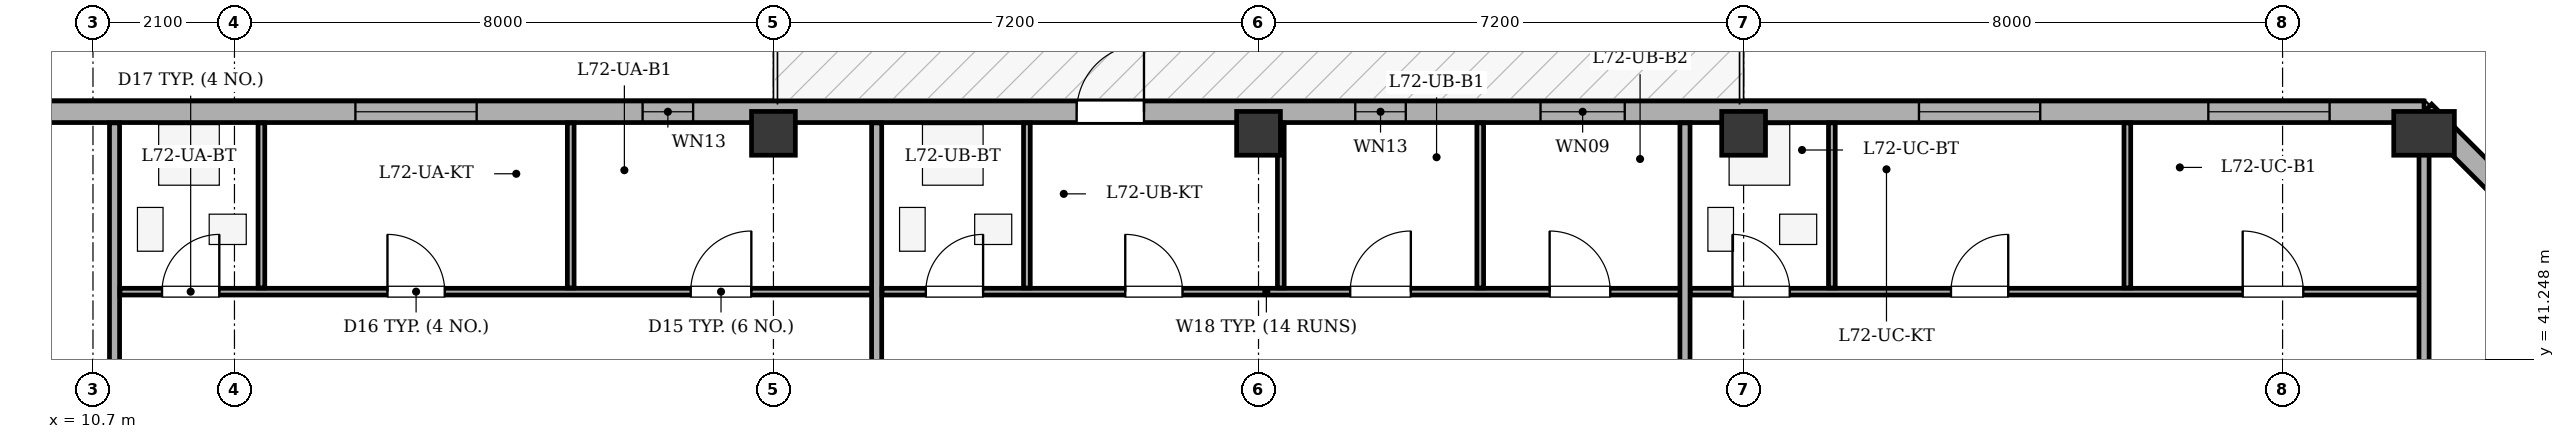
"""IFC4 building model, lengths in metres.
Left out: names, types, materials, properties, quantities, classifications, styles, units other than length and angle.
Written with IfcOpenShell. Run it as: python <this file> out.ifc"""

import sys

from ifc_helpers import new_model, si_unit, direction, frame, frame_2d, origin, origin_2d, place, context, subcontext, project, spatial, rectangle, extrude, element, fill, save


model = new_model("IFC4")
c1 = context("Model", 3, precision=1e-05, world=origin(), true_north=direction((0.0, 1.0)))
c2 = subcontext(c1, "Body", "Model", "MODEL_VIEW")
j1 = project(units=[si_unit("LENGTHUNIT", "METRE"), si_unit("PLANEANGLEUNIT", "RADIAN")], contexts=[c1])
p1 = place(None, origin())
s1 = spatial("IfcSite", under=j1, at=p1, CompositionType="ELEMENT")
p2 = place(p1, origin())
s2 = spatial("IfcBuilding", under=s1, at=p2, CompositionType="ELEMENT")
p3 = place(p2, frame((0.0, 0.0, 272.1)))
s3 = spatial("IfcBuildingStorey", under=s2, at=p3, CompositionType="ELEMENT", Elevation=272.1)
for number, where, z_axis, x_axis in (
    (1, (20.8, 44.6, 0.0), (0.0, 0.0, 1.0), (1.0, 0.0, 0.0)),
    (2, (28.0, 44.6, 0.0), (0.0, 0.0, 1.0), (1.0, 0.0, 0.0)),
    (3, (35.2, 44.6, 0.0), (0.0, 0.0, 1.0), (1.0, 0.0, 0.0)),
):
    element("IfcColumn", number, at=place(p3, frame(where, z_axis=z_axis, x_axis=x_axis)), inside=s3, PredefinedType="COLUMN", context=c2, shape_type="SweptSolid", body=[
        extrude(rectangle(XDim=0.65, YDim=0.65, at=origin_2d()), origin(), (0.0, 0.0, 1.0), 3.4),
    ])
p4 = place(p3, frame((45.3, 44.6, 0.0), z_axis=(0.0, 0.0, 1.0), x_axis=(1.0, 0.0, 0.0)))
e4 = element("IfcColumn", 4, at=p4, inside=s3, PredefinedType="COLUMN", context=c2, shape_type="SweptSolid", body=[
    extrude(rectangle(XDim=0.65, YDim=0.9, at=origin_2d()), origin(), (0.0, 0.0, 1.0), 3.4),
])
p5 = place(p3, frame((8.3, 44.92, 0.0), z_axis=(0.0, 0.0, 1.0), x_axis=(1.0, 0.0, 0.0)))
e5 = element("IfcWall", 5, at=p5, inside=s3, PredefinedType="STANDARD", context=c2, shape_type="SweptSolid", body=[
    extrude(rectangle(XDim=37.0, YDim=0.32, at=frame_2d((18.5, 0.0))), origin(), (0.0, 0.0, 1.0), 2.725),
])
p6 = place(p5, frame((17.0, 0.0, 0.0)))
e6 = element("IfcOpeningElement", 6, at=p6, cuts=e5, PredefinedType="OPENING", context=c2, shape_type="SweptSolid", body=[
    extrude(rectangle(XDim=1.0, YDim=2.02, at=frame_2d((0.5, 1.01))), frame((0.0, 0.17, 0.0), z_axis=(0.0, -1.0, 0.0), x_axis=(1.0, 0.0, 0.0)), (0.0, 0.0, 1.0), 0.34),
])
p7 = place(p5, frame((6.295, 0.0, 0.75)))
e7 = element("IfcOpeningElement", 7, at=p7, cuts=e5, PredefinedType="OPENING", context=c2, shape_type="SweptSolid", body=[
    extrude(rectangle(XDim=1.8, YDim=1.7, at=frame_2d((0.9, 0.85))), frame((0.0, 0.17, 0.0), z_axis=(0.0, -1.0, 0.0), x_axis=(1.0, 0.0, 0.0)), (0.0, 0.0, 1.0), 0.34),
])
p8 = place(p5, frame((23.886, 0.0, 0.75)))
e8 = element("IfcOpeningElement", 8, at=p8, cuts=e5, PredefinedType="OPENING", context=c2, shape_type="SweptSolid", body=[
    extrude(rectangle(XDim=1.25, YDim=1.7, at=frame_2d((0.625, 0.85))), frame((0.0, 0.17, 0.0), z_axis=(0.0, -1.0, 0.0), x_axis=(1.0, 0.0, 0.0)), (0.0, 0.0, 1.0), 0.34),
])
p9 = place(p5, frame((29.503, 0.0, 0.75)))
e9 = element("IfcOpeningElement", 9, at=p9, cuts=e5, PredefinedType="OPENING", context=c2, shape_type="SweptSolid", body=[
    extrude(rectangle(XDim=1.8, YDim=1.7, at=frame_2d((0.9, 0.85))), frame((0.0, 0.17, 0.0), z_axis=(0.0, -1.0, 0.0), x_axis=(1.0, 0.0, 0.0)), (0.0, 0.0, 1.0), 0.34),
])
p10 = place(p5, frame((33.798, 0.0, 0.75)))
e10 = element("IfcOpeningElement", 10, at=p10, cuts=e5, PredefinedType="OPENING", context=c2, shape_type="SweptSolid", body=[
    extrude(rectangle(XDim=1.8, YDim=1.7, at=frame_2d((0.9, 0.85))), frame((0.0, 0.17, 0.0), z_axis=(0.0, -1.0, 0.0), x_axis=(1.0, 0.0, 0.0)), (0.0, 0.0, 1.0), 0.34),
])
p11 = place(p5, frame((10.558, 0.0, 0.75)))
e11 = element("IfcOpeningElement", 11, at=p11, cuts=e5, PredefinedType="OPENING", context=c2, shape_type="SweptSolid", body=[
    extrude(rectangle(XDim=0.75, YDim=1.45, at=frame_2d((0.375, 0.725))), frame((0.0, 0.17, 0.0), z_axis=(0.0, -1.0, 0.0), x_axis=(1.0, 0.0, 0.0)), (0.0, 0.0, 1.0), 0.34),
])
p12 = place(p5, frame((21.136, 0.0, 0.75)))
e12 = element("IfcOpeningElement", 12, at=p12, cuts=e5, PredefinedType="OPENING", context=c2, shape_type="SweptSolid", body=[
    extrude(rectangle(XDim=0.75, YDim=1.45, at=frame_2d((0.375, 0.725))), frame((0.0, 0.17, 0.0), z_axis=(0.0, -1.0, 0.0), x_axis=(1.0, 0.0, 0.0)), (0.0, 0.0, 1.0), 0.34),
])
p13 = place(p3, frame((45.3, 44.92, 0.0), z_axis=(0.0, 0.0, 1.0), x_axis=(0.70712937715, -0.707084184501, 0.0)))
e13 = element("IfcWall", 13, at=p13, inside=s3, PredefinedType="STANDARD", context=c2, shape_type="SweptSolid", body=[
    extrude(rectangle(XDim=5.402, YDim=0.32, at=frame_2d((2.701, 0.0))), origin(), (0.0, 0.0, 1.0), 2.725),
])
p14 = place(p13, frame((2.001, 0.0, 0.75)))
e14 = element("IfcOpeningElement", 14, at=p14, cuts=e13, PredefinedType="OPENING", context=c2, shape_type="SweptSolid", body=[
    extrude(rectangle(XDim=1.4, YDim=1.65, at=frame_2d((0.7, 0.825))), frame((0.0, 0.17, 0.0), z_axis=(0.0, -1.0, 0.0), x_axis=(1.0, 0.0, 0.0)), (0.0, 0.0, 1.0), 0.34),
])
p15 = place(p3, frame((11.02, 36.1, 0.0), z_axis=(0.0, 0.0, 1.0), x_axis=(0.0, 1.0, 0.0)))
e15 = element("IfcWall", 15, at=p15, inside=s3, PredefinedType="PARTITIONING", context=c2, shape_type="SweptSolid", body=[
    extrude(rectangle(XDim=8.655, YDim=0.15, at=frame_2d((4.327, 0.0))), origin(), (0.0, 0.0, 1.0), 3.1),
])
p16 = place(p3, frame((11.1, 42.25, 0.0), z_axis=(0.0, 0.0, 1.0), x_axis=(1.0, 0.0, 0.0)))
e16 = element("IfcWall", 16, at=p16, inside=s3, PredefinedType="PARTITIONING", context=c2, shape_type="SweptSolid", body=[
    extrude(rectangle(XDim=11.272, YDim=0.1, at=frame_2d((5.636, 0.0))), origin(), (0.0, 0.0, 1.0), 3.1),
])
p17 = place(p16, frame((0.625, 0.0, 0.0)))
e17 = element("IfcOpeningElement", 17, at=p17, cuts=e16, PredefinedType="OPENING", context=c2, shape_type="SweptSolid", body=[
    extrude(rectangle(XDim=0.85, YDim=2.05, at=frame_2d((0.425, 1.025))), frame((0.0, 0.06, 0.0), z_axis=(0.0, -1.0, 0.0), x_axis=(1.0, 0.0, 0.0)), (0.0, 0.0, 1.0), 0.12),
])
p18 = place(p16, frame((3.971, 0.0, 0.0)))
e18 = element("IfcOpeningElement", 18, at=p18, cuts=e16, PredefinedType="OPENING", context=c2, shape_type="SweptSolid", body=[
    extrude(rectangle(XDim=0.85, YDim=2.05, at=frame_2d((0.425, 1.025))), frame((0.0, 0.06, 0.0), z_axis=(0.0, -1.0, 0.0), x_axis=(1.0, 0.0, 0.0)), (0.0, 0.0, 1.0), 0.12),
])
p19 = place(p16, frame((8.472, 0.0, 0.0)))
e19 = element("IfcOpeningElement", 19, at=p19, cuts=e16, PredefinedType="OPENING", context=c2, shape_type="SweptSolid", body=[
    extrude(rectangle(XDim=0.9, YDim=2.05, at=frame_2d((0.45, 1.025))), frame((0.0, 0.06, 0.0), z_axis=(0.0, -1.0, 0.0), x_axis=(1.0, 0.0, 0.0)), (0.0, 0.0, 1.0), 0.12),
])
p20 = place(p3, frame((13.2, 42.305, 0.0), z_axis=(0.0, 0.0, 1.0), x_axis=(0.0, 1.0, 0.0)))
e20 = element("IfcWall", 20, at=p20, inside=s3, PredefinedType="PARTITIONING", context=c2, shape_type="SweptSolid", body=[
    extrude(rectangle(XDim=2.45, YDim=0.1, at=frame_2d((1.225, 0.0))), origin(), (0.0, 0.0, 1.0), 3.1),
])
p21 = place(p3, frame((17.791, 42.305, 0.0), z_axis=(0.0, 0.0, 1.0), x_axis=(0.0, 1.0, 0.0)))
e21 = element("IfcWall", 21, at=p21, inside=s3, PredefinedType="PARTITIONING", context=c2, shape_type="SweptSolid", body=[
    extrude(rectangle(XDim=2.45, YDim=0.1, at=frame_2d((1.225, 0.0))), origin(), (0.0, 0.0, 1.0), 2.725),
])
p22 = place(p3, frame((22.332, 36.1, 0.0), z_axis=(0.0, 0.0, 1.0), x_axis=(0.0, 1.0, 0.0)))
e22 = element("IfcWall", 22, at=p22, inside=s3, PredefinedType="PARTITIONING", context=c2, shape_type="SweptSolid", body=[
    extrude(rectangle(XDim=8.655, YDim=0.15, at=frame_2d((4.327, 0.0))), origin(), (0.0, 0.0, 1.0), 2.725),
])
p23 = place(p3, frame((22.412, 42.25, 0.0), z_axis=(0.0, 0.0, 1.0), x_axis=(1.0, 0.0, 0.0)))
e23 = element("IfcWall", 23, at=p23, inside=s3, PredefinedType="PARTITIONING", context=c2, shape_type="SweptSolid", body=[
    extrude(rectangle(XDim=11.958, YDim=0.1, at=frame_2d((5.979, 0.0))), origin(), (0.0, 0.0, 1.0), 3.1),
])
p24 = place(p23, frame((0.65, 0.0, 0.0)))
e24 = element("IfcOpeningElement", 24, at=p24, cuts=e23, PredefinedType="OPENING", context=c2, shape_type="SweptSolid", body=[
    extrude(rectangle(XDim=0.85, YDim=2.05, at=frame_2d((0.425, 1.025))), frame((0.0, 0.06, 0.0), z_axis=(0.0, -1.0, 0.0), x_axis=(1.0, 0.0, 0.0)), (0.0, 0.0, 1.0), 0.12),
])
p25 = place(p23, frame((3.61, 0.0, 0.0)))
e25 = element("IfcOpeningElement", 25, at=p25, cuts=e23, PredefinedType="OPENING", context=c2, shape_type="SweptSolid", body=[
    extrude(rectangle(XDim=0.85, YDim=2.05, at=frame_2d((0.425, 1.025))), frame((0.0, 0.06, 0.0), z_axis=(0.0, -1.0, 0.0), x_axis=(1.0, 0.0, 0.0)), (0.0, 0.0, 1.0), 0.12),
])
p26 = place(p23, frame((6.949, 0.0, 0.0)))
e26 = element("IfcOpeningElement", 26, at=p26, cuts=e23, PredefinedType="OPENING", context=c2, shape_type="SweptSolid", body=[
    extrude(rectangle(XDim=0.9, YDim=2.05, at=frame_2d((0.45, 1.025))), frame((0.0, 0.06, 0.0), z_axis=(0.0, -1.0, 0.0), x_axis=(1.0, 0.0, 0.0)), (0.0, 0.0, 1.0), 0.12),
])
p27 = place(p23, frame((9.909, 0.0, 0.0)))
e27 = element("IfcOpeningElement", 27, at=p27, cuts=e23, PredefinedType="OPENING", context=c2, shape_type="SweptSolid", body=[
    extrude(rectangle(XDim=0.9, YDim=2.05, at=frame_2d((0.45, 1.025))), frame((0.0, 0.06, 0.0), z_axis=(0.0, -1.0, 0.0), x_axis=(1.0, 0.0, 0.0)), (0.0, 0.0, 1.0), 0.12),
])
for number, where, z_axis, x_axis in (
    (28, (24.562, 42.305, 0.0), (0.0, 0.0, 1.0), (0.0, 1.0, 0.0)),
    (29, (28.331, 42.305, 0.0), (0.0, 0.0, 1.0), (0.0, 1.0, 0.0)),
    (30, (31.291, 42.305, 0.0), (0.0, 0.0, 1.0), (0.0, 1.0, 0.0)),
):
    element("IfcWall", number, at=place(p3, frame(where, z_axis=z_axis, x_axis=x_axis)), inside=s3, PredefinedType="PARTITIONING", context=c2, shape_type="SweptSolid", body=[
        extrude(rectangle(XDim=2.45, YDim=0.1, at=frame_2d((1.225, 0.0))), origin(), (0.0, 0.0, 1.0), 3.1),
    ])
p28 = place(p3, frame((34.33, 36.1, 0.0), z_axis=(0.0, 0.0, 1.0), x_axis=(0.0, 1.0, 0.0)))
e31 = element("IfcWall", 31, at=p28, inside=s3, PredefinedType="PARTITIONING", context=c2, shape_type="SweptSolid", body=[
    extrude(rectangle(XDim=8.655, YDim=0.15, at=frame_2d((4.327, 0.0))), origin(), (0.0, 0.0, 1.0), 3.1),
])
p29 = place(p3, frame((34.41, 42.25, 0.0), z_axis=(0.0, 0.0, 1.0), x_axis=(1.0, 0.0, 0.0)))
e32 = element("IfcWall", 32, at=p29, inside=s3, PredefinedType="PARTITIONING", context=c2, shape_type="SweptSolid", body=[
    extrude(rectangle(XDim=10.93, YDim=0.1, at=frame_2d((5.465, 0.0))), origin(), (0.0, 0.0, 1.0), 3.1),
])
p30 = place(p29, frame((0.625, 0.0, 0.0)))
e33 = element("IfcOpeningElement", 33, at=p30, cuts=e32, PredefinedType="OPENING", context=c2, shape_type="SweptSolid", body=[
    extrude(rectangle(XDim=0.85, YDim=2.05, at=frame_2d((0.425, 1.025))), frame((0.0, 0.06, 0.0), z_axis=(0.0, -1.0, 0.0), x_axis=(1.0, 0.0, 0.0)), (0.0, 0.0, 1.0), 0.12),
])
p31 = place(p29, frame((3.868, 0.0, 0.0)))
e34 = element("IfcOpeningElement", 34, at=p31, cuts=e32, PredefinedType="OPENING", context=c2, shape_type="SweptSolid", body=[
    extrude(rectangle(XDim=0.85, YDim=2.05, at=frame_2d((0.425, 1.025))), frame((0.0, 0.06, 0.0), z_axis=(0.0, -1.0, 0.0), x_axis=(1.0, 0.0, 0.0)), (0.0, 0.0, 1.0), 0.12),
])
p32 = place(p29, frame((8.198, 0.0, 0.0)))
e35 = element("IfcOpeningElement", 35, at=p32, cuts=e32, PredefinedType="OPENING", context=c2, shape_type="SweptSolid", body=[
    extrude(rectangle(XDim=0.9, YDim=2.05, at=frame_2d((0.45, 1.025))), frame((0.0, 0.06, 0.0), z_axis=(0.0, -1.0, 0.0), x_axis=(1.0, 0.0, 0.0)), (0.0, 0.0, 1.0), 0.12),
])
p33 = place(p3, frame((36.51, 42.305, 0.0), z_axis=(0.0, 0.0, 1.0), x_axis=(0.0, 1.0, 0.0)))
e36 = element("IfcWall", 36, at=p33, inside=s3, PredefinedType="PARTITIONING", context=c2, shape_type="SweptSolid", body=[
    extrude(rectangle(XDim=2.45, YDim=0.1, at=frame_2d((1.225, 0.0))), origin(), (0.0, 0.0, 1.0), 2.725),
])
p34 = place(p3, frame((40.896, 42.305, 0.0), z_axis=(0.0, 0.0, 1.0), x_axis=(0.0, 1.0, 0.0)))
e37 = element("IfcWall", 37, at=p34, inside=s3, PredefinedType="PARTITIONING", context=c2, shape_type="SweptSolid", body=[
    extrude(rectangle(XDim=2.45, YDim=0.1, at=frame_2d((1.225, 0.0))), origin(), (0.0, 0.0, 1.0), 3.1),
])
p35 = place(p3, frame((45.3, 36.1, 0.0), z_axis=(0.0, 0.0, 1.0), x_axis=(0.0, 1.0, 0.0)))
e38 = element("IfcWall", 38, at=p35, inside=s3, PredefinedType="PARTITIONING", context=c2, shape_type="SweptSolid", body=[
    extrude(rectangle(XDim=8.655, YDim=0.15, at=frame_2d((4.327, 0.0))), origin(), (0.0, 0.0, 1.0), 3.1),
])
p36 = place(p6, origin())
e39 = element("IfcDoor", 39, at=p36, inside=s3, OperationType="SINGLE_SWING_RIGHT", PredefinedType="DOOR", context=c2, shape_type="SweptSolid", body=[
    extrude(rectangle(XDim=1.0, YDim=2.02, at=frame_2d((0.5, 1.01))), frame((0.0, 0.025, 0.0), z_axis=(0.0, -1.0, 0.0), x_axis=(1.0, 0.0, 0.0)), (0.0, 0.0, 1.0), 0.05),
])
fill(e6, e39)
p37 = place(p7, origin())
e40 = element("IfcWindow", 40, at=p37, inside=s3, PartitioningType="SINGLE_PANEL", PredefinedType="WINDOW", context=c2, shape_type="SweptSolid", body=[
    extrude(rectangle(XDim=1.8, YDim=1.7, at=frame_2d((0.9, 0.85))), frame((0.0, -0.01, 0.0), z_axis=(0.0, -1.0, 0.0), x_axis=(1.0, 0.0, 0.0)), (0.0, 0.0, 1.0), 0.06),
])
fill(e7, e40)
p38 = place(p8, origin())
e41 = element("IfcWindow", 41, at=p38, inside=s3, PartitioningType="SINGLE_PANEL", PredefinedType="WINDOW", context=c2, shape_type="SweptSolid", body=[
    extrude(rectangle(XDim=1.25, YDim=1.7, at=frame_2d((0.625, 0.85))), frame((0.0, -0.01, 0.0), z_axis=(0.0, -1.0, 0.0), x_axis=(1.0, 0.0, 0.0)), (0.0, 0.0, 1.0), 0.06),
])
fill(e8, e41)
p39 = place(p9, origin())
e42 = element("IfcWindow", 42, at=p39, inside=s3, PartitioningType="SINGLE_PANEL", PredefinedType="WINDOW", context=c2, shape_type="SweptSolid", body=[
    extrude(rectangle(XDim=1.8, YDim=1.7, at=frame_2d((0.9, 0.85))), frame((0.0, -0.01, 0.0), z_axis=(0.0, -1.0, 0.0), x_axis=(1.0, 0.0, 0.0)), (0.0, 0.0, 1.0), 0.06),
])
fill(e9, e42)
p40 = place(p10, origin())
e43 = element("IfcWindow", 43, at=p40, inside=s3, PartitioningType="SINGLE_PANEL", PredefinedType="WINDOW", context=c2, shape_type="SweptSolid", body=[
    extrude(rectangle(XDim=1.8, YDim=1.7, at=frame_2d((0.9, 0.85))), frame((0.0, -0.01, 0.0), z_axis=(0.0, -1.0, 0.0), x_axis=(1.0, 0.0, 0.0)), (0.0, 0.0, 1.0), 0.06),
])
fill(e10, e43)
p41 = place(p11, origin())
e44 = element("IfcWindow", 44, at=p41, inside=s3, PartitioningType="SINGLE_PANEL", PredefinedType="WINDOW", context=c2, shape_type="SweptSolid", body=[
    extrude(rectangle(XDim=0.75, YDim=1.45, at=frame_2d((0.375, 0.725))), frame((0.0, -0.01, 0.0), z_axis=(0.0, -1.0, 0.0), x_axis=(1.0, 0.0, 0.0)), (0.0, 0.0, 1.0), 0.06),
])
fill(e11, e44)
p42 = place(p12, origin())
e45 = element("IfcWindow", 45, at=p42, inside=s3, PartitioningType="SINGLE_PANEL", PredefinedType="WINDOW", context=c2, shape_type="SweptSolid", body=[
    extrude(rectangle(XDim=0.75, YDim=1.45, at=frame_2d((0.375, 0.725))), frame((0.0, -0.01, 0.0), z_axis=(0.0, -1.0, 0.0), x_axis=(1.0, 0.0, 0.0)), (0.0, 0.0, 1.0), 0.06),
])
fill(e12, e45)
p43 = place(p17, origin())
e46 = element("IfcDoor", 46, at=p43, inside=s3, OperationType="SINGLE_SWING_RIGHT", PredefinedType="DOOR", context=c2, shape_type="SweptSolid", body=[
    extrude(rectangle(XDim=0.85, YDim=2.05, at=frame_2d((0.425, 1.025))), frame((0.0, 0.025, 0.0), z_axis=(0.0, -1.0, 0.0), x_axis=(1.0, 0.0, 0.0)), (0.0, 0.0, 1.0), 0.05),
])
fill(e17, e46)
p44 = place(p18, origin())
e47 = element("IfcDoor", 47, at=p44, inside=s3, OperationType="SINGLE_SWING_LEFT", PredefinedType="DOOR", context=c2, shape_type="SweptSolid", body=[
    extrude(rectangle(XDim=0.85, YDim=2.05, at=frame_2d((0.425, 1.025))), frame((0.0, 0.025, 0.0), z_axis=(0.0, -1.0, 0.0), x_axis=(1.0, 0.0, 0.0)), (0.0, 0.0, 1.0), 0.05),
])
fill(e18, e47)
p45 = place(p19, origin())
e48 = element("IfcDoor", 48, at=p45, inside=s3, OperationType="SINGLE_SWING_RIGHT", PredefinedType="DOOR", context=c2, shape_type="SweptSolid", body=[
    extrude(rectangle(XDim=0.9, YDim=2.05, at=frame_2d((0.45, 1.025))), frame((0.0, 0.025, 0.0), z_axis=(0.0, -1.0, 0.0), x_axis=(1.0, 0.0, 0.0)), (0.0, 0.0, 1.0), 0.05),
])
fill(e19, e48)
p46 = place(p24, origin())
e49 = element("IfcDoor", 49, at=p46, inside=s3, OperationType="SINGLE_SWING_RIGHT", PredefinedType="DOOR", context=c2, shape_type="SweptSolid", body=[
    extrude(rectangle(XDim=0.85, YDim=2.05, at=frame_2d((0.425, 1.025))), frame((0.0, 0.025, 0.0), z_axis=(0.0, -1.0, 0.0), x_axis=(1.0, 0.0, 0.0)), (0.0, 0.0, 1.0), 0.05),
])
fill(e24, e49)
p47 = place(p25, origin())
e50 = element("IfcDoor", 50, at=p47, inside=s3, OperationType="SINGLE_SWING_LEFT", PredefinedType="DOOR", context=c2, shape_type="SweptSolid", body=[
    extrude(rectangle(XDim=0.85, YDim=2.05, at=frame_2d((0.425, 1.025))), frame((0.0, 0.025, 0.0), z_axis=(0.0, -1.0, 0.0), x_axis=(1.0, 0.0, 0.0)), (0.0, 0.0, 1.0), 0.05),
])
fill(e25, e50)
p48 = place(p26, origin())
e51 = element("IfcDoor", 51, at=p48, inside=s3, OperationType="SINGLE_SWING_RIGHT", PredefinedType="DOOR", context=c2, shape_type="SweptSolid", body=[
    extrude(rectangle(XDim=0.9, YDim=2.05, at=frame_2d((0.45, 1.025))), frame((0.0, 0.025, 0.0), z_axis=(0.0, -1.0, 0.0), x_axis=(1.0, 0.0, 0.0)), (0.0, 0.0, 1.0), 0.05),
])
fill(e26, e51)
p49 = place(p27, origin())
e52 = element("IfcDoor", 52, at=p49, inside=s3, OperationType="SINGLE_SWING_LEFT", PredefinedType="DOOR", context=c2, shape_type="SweptSolid", body=[
    extrude(rectangle(XDim=0.9, YDim=2.05, at=frame_2d((0.45, 1.025))), frame((0.0, 0.025, 0.0), z_axis=(0.0, -1.0, 0.0), x_axis=(1.0, 0.0, 0.0)), (0.0, 0.0, 1.0), 0.05),
])
fill(e27, e52)
p50 = place(p30, origin())
e53 = element("IfcDoor", 53, at=p50, inside=s3, OperationType="SINGLE_SWING_LEFT", PredefinedType="DOOR", context=c2, shape_type="SweptSolid", body=[
    extrude(rectangle(XDim=0.85, YDim=2.05, at=frame_2d((0.425, 1.025))), frame((0.0, 0.025, 0.0), z_axis=(0.0, -1.0, 0.0), x_axis=(1.0, 0.0, 0.0)), (0.0, 0.0, 1.0), 0.05),
])
fill(e33, e53)
p51 = place(p31, origin())
e54 = element("IfcDoor", 54, at=p51, inside=s3, OperationType="SINGLE_SWING_RIGHT", PredefinedType="DOOR", context=c2, shape_type="SweptSolid", body=[
    extrude(rectangle(XDim=0.85, YDim=2.05, at=frame_2d((0.425, 1.025))), frame((0.0, 0.025, 0.0), z_axis=(0.0, -1.0, 0.0), x_axis=(1.0, 0.0, 0.0)), (0.0, 0.0, 1.0), 0.05),
])
fill(e34, e54)
p52 = place(p32, origin())
e55 = element("IfcDoor", 55, at=p52, inside=s3, OperationType="SINGLE_SWING_LEFT", PredefinedType="DOOR", context=c2, shape_type="SweptSolid", body=[
    extrude(rectangle(XDim=0.9, YDim=2.05, at=frame_2d((0.45, 1.025))), frame((0.0, 0.025, 0.0), z_axis=(0.0, -1.0, 0.0), x_axis=(1.0, 0.0, 0.0)), (0.0, 0.0, 1.0), 0.05),
])
fill(e35, e55)
save(model, sys.argv[1])
